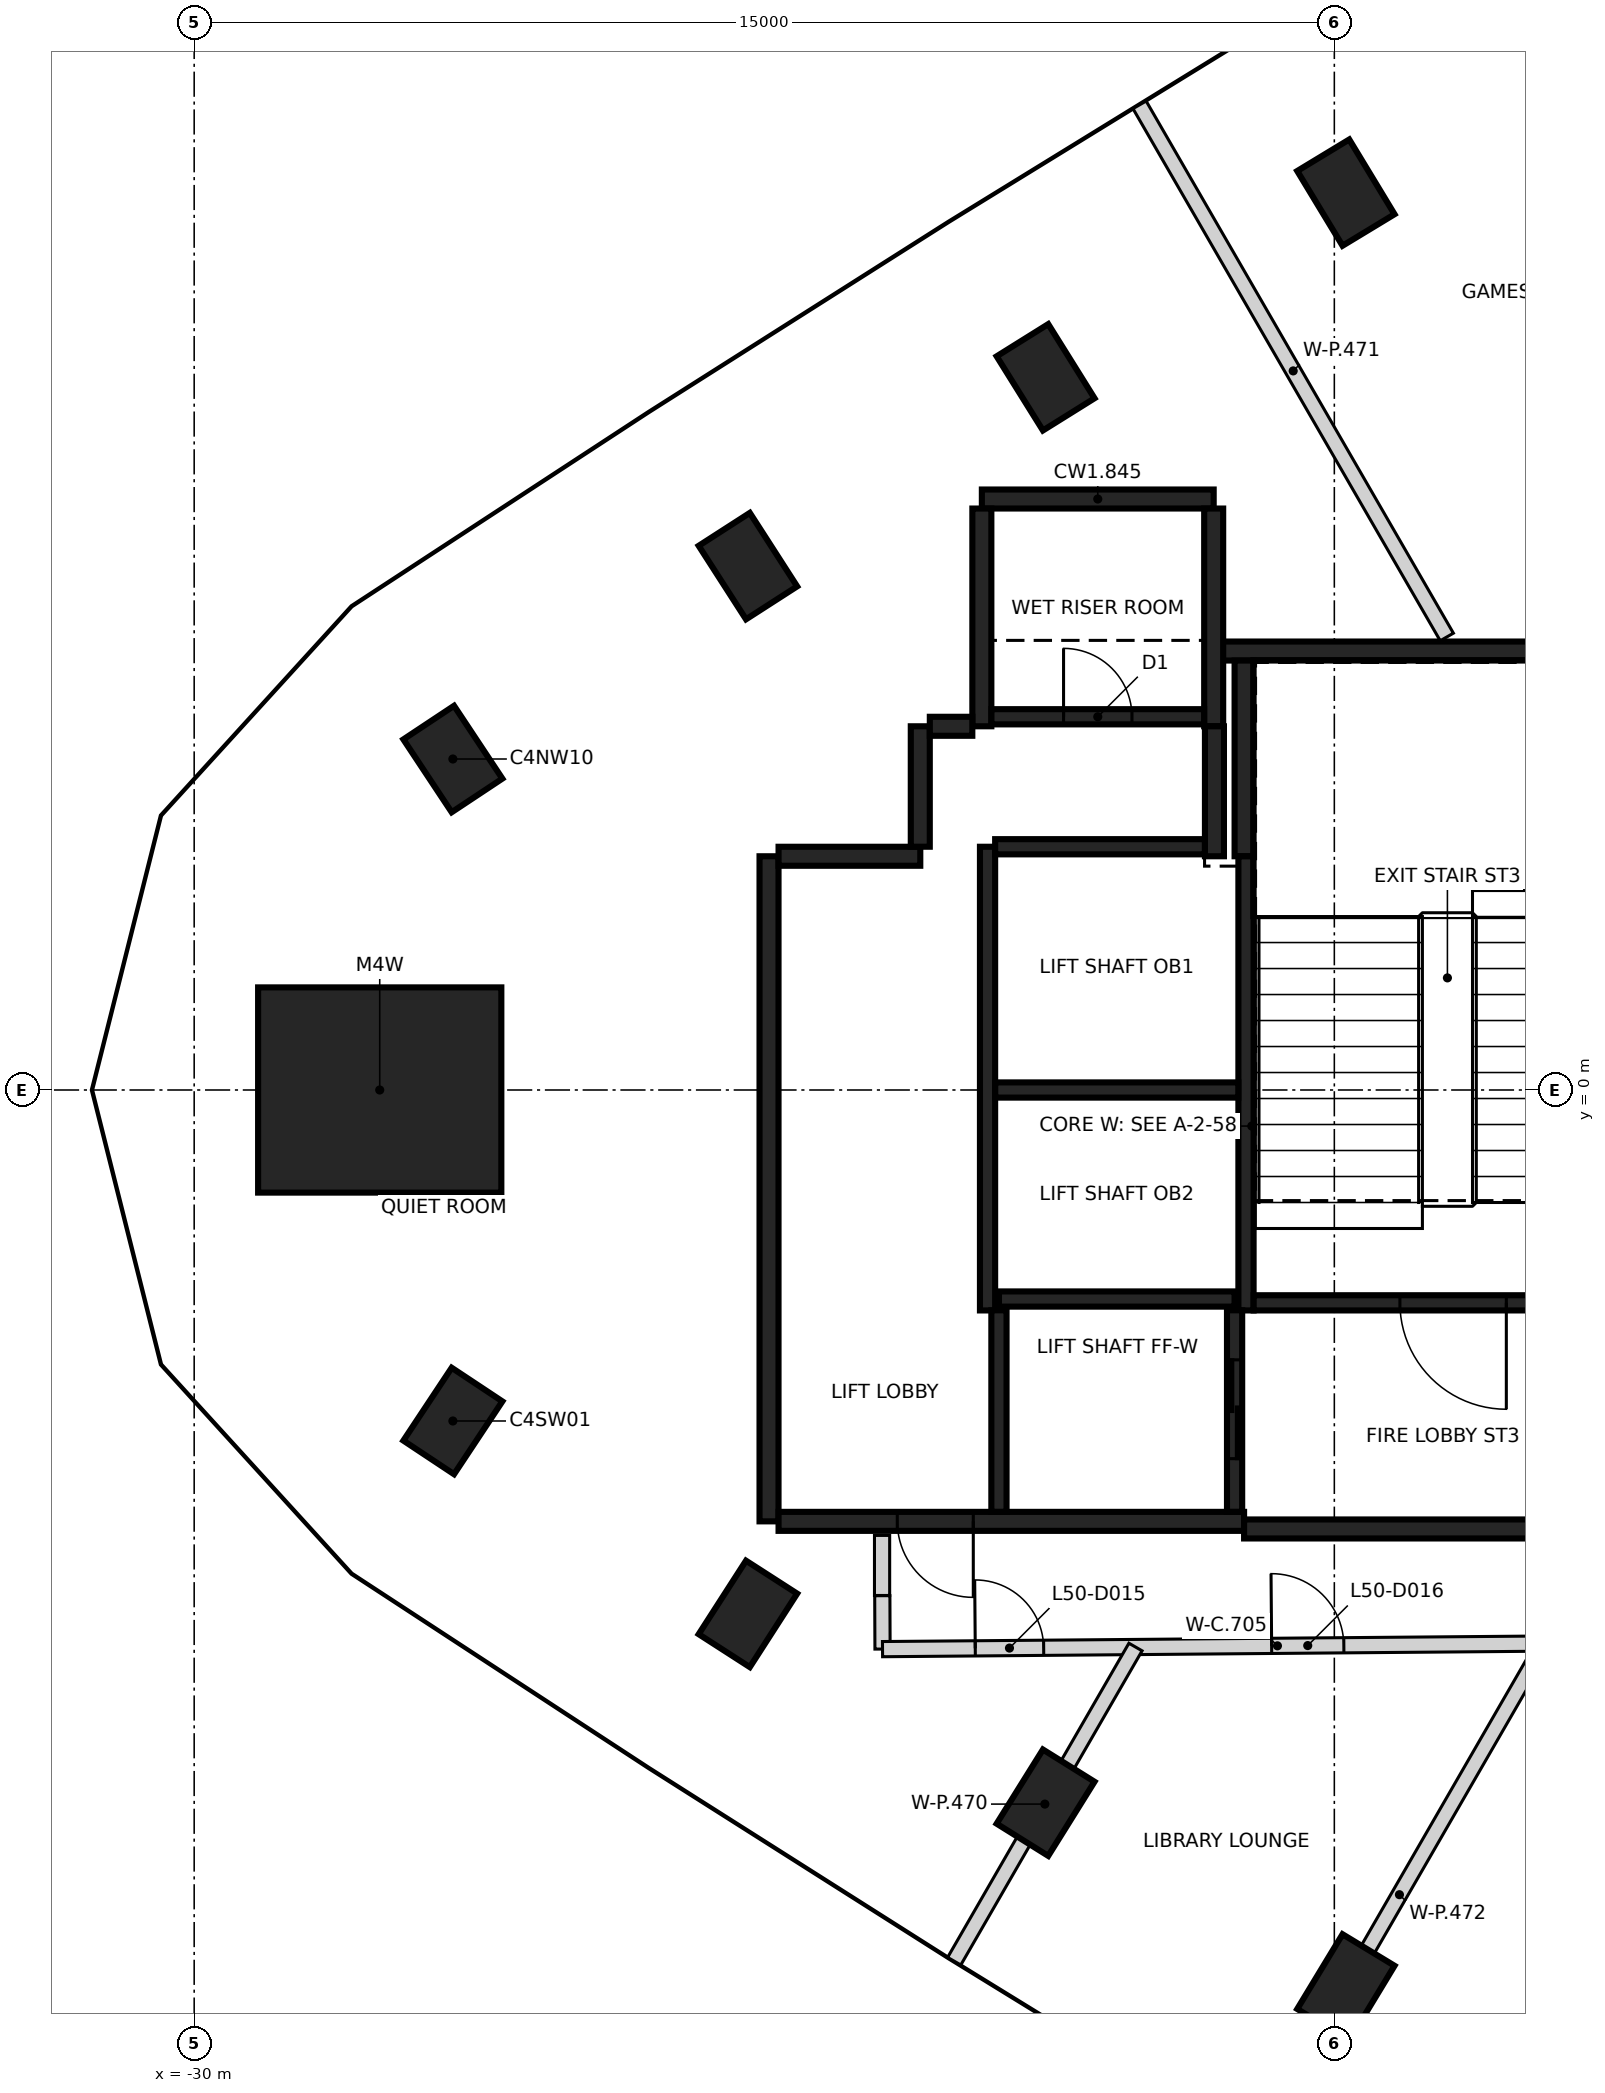
"""IFC4 building model, lengths in metres.
Left out: names, types, materials, properties, quantities, classifications, styles, units other than length and angle.
Written with IfcOpenShell. Run it as: python <this file> out.ifc"""

import sys

from ifc_helpers import new_model, si_unit, direction, frame, frame_2d, origin, origin_2d, place, context, subcontext, project, spatial, rectangle, extrude, element, fill, save


model = new_model("IFC4")
c1 = context("Model", 3, precision=1e-05, world=origin(), true_north=direction((0.0, 1.0)))
c2 = subcontext(c1, "Body", "Model", "MODEL_VIEW")
j1 = project(units=[si_unit("LENGTHUNIT", "METRE"), si_unit("PLANEANGLEUNIT", "RADIAN")], contexts=[c1])
p1 = place(None, origin())
s1 = spatial("IfcSite", under=j1, at=p1, CompositionType="ELEMENT")
p2 = place(p1, origin())
s2 = spatial("IfcBuilding", under=s1, at=p2, CompositionType="ELEMENT")
p3 = place(p2, frame((0.0, 0.0, 200.8)))
s3 = spatial("IfcBuildingStorey", under=s2, at=p3, CompositionType="ELEMENT", Elevation=200.8)
for number, where, z_axis, x_axis in (
    (1, (-14.848, 11.806, -0.35), (0.0, 0.0, 1.0), (-0.518, 0.855, 0.0)),
    (2, (-18.799, 9.376, -0.35), (0.0, 0.0, 1.0), (-0.529, 0.848, 0.0)),
    (3, (-22.715, 6.892, -0.35), (0.0, 0.0, 1.0), (-0.541, 0.841, 0.0)),
    (4, (-26.597, 4.354, -0.35), (0.0, 0.0, 1.0), (-0.553, 0.833, 0.0)),
    (5, (-26.597, -4.354, -0.35), (0.0, 0.0, 1.0), (0.553, 0.833, 0.0)),
    (6, (-22.715, -6.892, -0.35), (0.0, 0.0, 1.0), (0.541, 0.841, 0.0)),
    (7, (-18.799, -9.376, -0.35), (0.0, 0.0, 1.0), (0.529, 0.848, 0.0)),
    (8, (-14.848, -11.806, -0.35), (0.0, 0.0, 1.0), (0.518, 0.855, 0.0)),
):
    element("IfcColumn", number, at=place(p3, frame(where, z_axis=z_axis, x_axis=x_axis)), inside=s3, PredefinedType="COLUMN", context=c2, shape_type="SweptSolid", body=[
        extrude(rectangle(XDim=1.15, YDim=0.8, at=origin_2d()), origin(), (0.0, 0.0, 1.0), 3.6),
    ])
p4 = place(p3, frame((-27.559, 0.0, -0.35), z_axis=(0.0, 0.0, 1.0), x_axis=(1.0, 0.0, 0.0)))
e9 = element("IfcColumn", 9, at=p4, inside=s3, PredefinedType="COLUMN", context=c2, shape_type="SweptSolid", body=[
    extrude(rectangle(XDim=3.2, YDim=2.7, at=origin_2d()), origin(), (0.0, 0.0, 1.0), 3.6),
])
p5 = place(p3, frame((-22.437, -5.675, 0.0), z_axis=(0.0, 0.0, 1.0), x_axis=(0.0, 1.0, 0.0)))
e10 = element("IfcWall", 10, at=p5, inside=s3, PredefinedType="SHEAR", context=c2, shape_type="SweptSolid", body=[
    extrude(rectangle(XDim=8.75, YDim=0.25, at=frame_2d((4.375, 0.0))), origin(), (0.0, 0.0, 1.0), 3.25),
])
p6 = place(p3, frame((-16.187, -5.675, 0.0), z_axis=(0.0, 0.0, 1.0), x_axis=(-1.0, 0.0, 0.0)))
e11 = element("IfcWall", 11, at=p6, inside=s3, PredefinedType="SHEAR", context=c2, shape_type="SweptSolid", body=[
    extrude(rectangle(XDim=6.125, YDim=0.25, at=frame_2d((3.062, 0.0))), origin(), (0.0, 0.0, 1.0), 3.25),
])
p7 = place(p6, frame((3.563, 0.0, 0.0)))
e12 = element("IfcOpeningElement", 12, at=p7, cuts=e11, PredefinedType="OPENING", context=c2, shape_type="SweptSolid", body=[
    extrude(rectangle(XDim=1.0, YDim=2.1, at=frame_2d((0.5, 1.05))), frame((0.0, 0.135, 0.0), z_axis=(0.0, -1.0, 0.0), x_axis=(1.0, 0.0, 0.0)), (0.0, 0.0, 1.0), 0.27),
])
p8 = place(p3, frame((-10.963, -5.775, 0.0), z_axis=(0.0, 0.0, 1.0), x_axis=(-1.0, 0.0, 0.0)))
e13 = element("IfcWall", 13, at=p8, inside=s3, PredefinedType="SHEAR", context=c2, shape_type="SweptSolid", body=[
    extrude(rectangle(XDim=5.225, YDim=0.25, at=frame_2d((2.612, 0.0))), origin(), (0.0, 0.0, 1.0), 3.25),
])
p9 = place(p3, frame((-16.472, 5.775, 0.0), z_axis=(0.0, 0.0, 1.0), x_axis=(1.0, 0.0, 0.0)))
e14 = element("IfcWall", 14, at=p9, inside=s3, PredefinedType="SHEAR", context=c2, shape_type="SweptSolid", body=[
    extrude(rectangle(XDim=5.51, YDim=0.25, at=frame_2d((2.755, 0.0))), origin(), (0.0, 0.0, 1.0), 3.25),
])
p10 = place(p3, frame((-19.637, 7.775, 0.0), z_axis=(0.0, 0.0, 1.0), x_axis=(1.0, 0.0, 0.0)))
e15 = element("IfcWall", 15, at=p10, inside=s3, PredefinedType="SHEAR", context=c2, shape_type="SweptSolid", body=[
    extrude(rectangle(XDim=3.05, YDim=0.25, at=frame_2d((1.525, 0.0))), origin(), (0.0, 0.0, 1.0), 3.25),
])
for number, where, z_axis, x_axis in (
    (16, (-16.587, 7.65, 0.0), (0.0, 0.0, 1.0), (0.0, -1.0, 0.0)),
    (17, (-19.637, 4.785, 0.0), (0.0, 0.0, 1.0), (0.0, 1.0, 0.0)),
):
    element("IfcWall", number, at=place(p3, frame(where, z_axis=z_axis, x_axis=x_axis)), inside=s3, PredefinedType="SHEAR", context=c2, shape_type="SweptSolid", body=[
        extrude(rectangle(XDim=2.865, YDim=0.25, at=frame_2d((1.432, 0.0))), origin(), (0.0, 0.0, 1.0), 3.25),
    ])
p11 = place(p3, frame((-16.187, 3.075, 0.0), z_axis=(0.0, 0.0, 1.0), x_axis=(0.0, 1.0, 0.0)))
e18 = element("IfcWall", 18, at=p11, inside=s3, PredefinedType="SHEAR", context=c2, shape_type="SweptSolid", body=[
    extrude(rectangle(XDim=2.575, YDim=0.25, at=frame_2d((1.287, 0.0))), origin(), (0.0, 0.0, 1.0), 3.25),
])
p12 = place(p3, frame((-22.312, 3.075, 0.0), z_axis=(0.0, 0.0, 1.0), x_axis=(1.0, 0.0, 0.0)))
e19 = element("IfcWall", 19, at=p12, inside=s3, PredefinedType="SHEAR", context=c2, shape_type="SweptSolid", body=[
    extrude(rectangle(XDim=1.865, YDim=0.25, at=frame_2d((0.932, 0.0))), origin(), (0.0, 0.0, 1.0), 3.25),
])
p13 = place(p3, frame((-16.577, 4.785, 0.0), z_axis=(0.0, 0.0, 1.0), x_axis=(0.0, -1.0, 0.0)))
e20 = element("IfcWall", 20, at=p13, inside=s3, PredefinedType="SHEAR", context=c2, shape_type="SweptSolid", body=[
    extrude(rectangle(XDim=1.71, YDim=0.25, at=frame_2d((0.855, 0.0))), origin(), (0.0, 0.0, 1.0), 3.25),
])
p14 = place(p3, frame((-20.447, 3.2, 0.0), z_axis=(0.0, 0.0, 1.0), x_axis=(0.0, 1.0, 0.0)))
e21 = element("IfcWall", 21, at=p14, inside=s3, PredefinedType="SHEAR", context=c2, shape_type="SweptSolid", body=[
    extrude(rectangle(XDim=1.584, YDim=0.25, at=frame_2d((0.792, 0.0))), origin(), (0.0, 0.0, 1.0), 3.25),
])
p15 = place(p3, frame((-20.322, 4.785, 0.0), z_axis=(0.0, 0.0, 1.0), x_axis=(1.0, 0.0, 0.0)))
e22 = element("IfcWall", 22, at=p15, inside=s3, PredefinedType="SHEAR", context=c2, shape_type="SweptSolid", body=[
    extrude(rectangle(XDim=0.559, YDim=0.25, at=frame_2d((0.28, 0.0))), origin(), (0.0, 0.0, 1.0), 3.25),
])
p16 = place(p3, frame((-16.162, 3.074, 0.0), z_axis=(0.0, 0.0, 1.0), x_axis=(0.0, -1.0, 0.0)))
e23 = element("IfcWall", 23, at=p16, inside=s3, PredefinedType="SHEAR", context=c2, shape_type="SweptSolid", body=[
    extrude(rectangle(XDim=5.974, YDim=0.2, at=frame_2d((2.987, 0.0))), origin(), (0.0, 0.0, 1.0), 3.25),
])
p17 = place(p3, frame((-19.562, -2.9, 0.0), z_axis=(0.0, 0.0, 1.0), x_axis=(0.0, 1.0, 0.0)))
e24 = element("IfcWall", 24, at=p17, inside=s3, PredefinedType="SHEAR", context=c2, shape_type="SweptSolid", body=[
    extrude(rectangle(XDim=6.1, YDim=0.2, at=frame_2d((3.05, 0.0))), origin(), (0.0, 0.0, 1.0), 3.25),
])
p18 = place(p3, frame((-10.963, -2.8, 0.0), z_axis=(0.0, 0.0, 1.0), x_axis=(-1.0, 0.0, 0.0)))
e25 = element("IfcWall", 25, at=p18, inside=s3, PredefinedType="SHEAR", context=c2, shape_type="SweptSolid", body=[
    extrude(rectangle(XDim=5.098, YDim=0.2, at=frame_2d((2.549, 0.0))), origin(), (0.0, 0.0, 1.0), 3.25),
])
p19 = place(p18, frame((1.774, 0.0, 0.0)))
e26 = element("IfcOpeningElement", 26, at=p19, cuts=e25, PredefinedType="OPENING", context=c2, shape_type="SweptSolid", body=[
    extrude(rectangle(XDim=1.4, YDim=2.1, at=frame_2d((0.7, 1.05))), frame((0.0, 0.11, 0.0), z_axis=(0.0, -1.0, 0.0), x_axis=(1.0, 0.0, 0.0)), (0.0, 0.0, 1.0), 0.22),
])
p20 = place(p3, frame((-16.263, 0.0, 0.0), z_axis=(0.0, 0.0, 1.0), x_axis=(-1.0, 0.0, 0.0)))
e27 = element("IfcWall", 27, at=p20, inside=s3, PredefinedType="SHEAR", context=c2, shape_type="SweptSolid", body=[
    extrude(rectangle(XDim=3.198, YDim=0.2, at=frame_2d((1.599, 0.0))), origin(), (0.0, 0.0, 1.0), 3.25),
])
p21 = place(p3, frame((-19.511, 4.91, 0.0), z_axis=(0.0, 0.0, 1.0), x_axis=(1.0, 0.0, 0.0)))
e28 = element("IfcWall", 28, at=p21, inside=s3, PredefinedType="SHEAR", context=c2, shape_type="SweptSolid", body=[
    extrude(rectangle(XDim=2.798, YDim=0.2, at=frame_2d((1.399, 0.0))), origin(), (0.0, 0.0, 1.0), 3.25),
])
p22 = place(p21, frame((0.949, 0.0, 0.0)))
e29 = element("IfcOpeningElement", 29, at=p22, cuts=e28, PredefinedType="OPENING", context=c2, shape_type="SweptSolid", body=[
    extrude(rectangle(XDim=0.9, YDim=2.1, at=frame_2d((0.45, 1.05))), frame((0.0, 0.11, 0.0), z_axis=(0.0, -1.0, 0.0), x_axis=(1.0, 0.0, 0.0)), (0.0, 0.0, 1.0), 0.22),
])
p23 = place(p3, frame((-19.462, 3.2, 0.0), z_axis=(0.0, 0.0, 1.0), x_axis=(1.0, 0.0, 0.0)))
e30 = element("IfcWall", 30, at=p23, inside=s3, PredefinedType="SHEAR", context=c2, shape_type="SweptSolid", body=[
    extrude(rectangle(XDim=2.759, YDim=0.2, at=frame_2d((1.379, 0.0))), origin(), (0.0, 0.0, 1.0), 3.25),
])
p24 = place(p3, frame((-19.412, -2.75, 0.0), z_axis=(0.0, 0.0, 1.0), x_axis=(1.0, 0.0, 0.0)))
e31 = element("IfcWall", 31, at=p24, inside=s3, PredefinedType="SHEAR", context=c2, shape_type="SweptSolid", body=[
    extrude(rectangle(XDim=3.1, YDim=0.2, at=frame_2d((1.55, 0.0))), origin(), (0.0, 0.0, 1.0), 3.25),
])
p25 = place(p3, frame((-16.312, -2.898, 0.0), z_axis=(0.0, 0.0, 1.0), x_axis=(0.0, -1.0, 0.0)))
e32 = element("IfcWall", 32, at=p25, inside=s3, PredefinedType="SHEAR", context=c2, shape_type="SweptSolid", body=[
    extrude(rectangle(XDim=2.651, YDim=0.2, at=frame_2d((1.325, 0.0))), origin(), (0.0, 0.0, 1.0), 3.25),
])
p26 = place(p25, frame((0.652, 0.0, 0.0)))
e33 = element("IfcOpeningElement", 33, at=p26, cuts=e32, PredefinedType="OPENING", context=c2, shape_type="SweptSolid", body=[
    extrude(rectangle(XDim=1.3, YDim=2.1, at=frame_2d((0.65, 1.05))), frame((0.0, 0.11, 0.0), z_axis=(0.0, -1.0, 0.0), x_axis=(1.0, 0.0, 0.0)), (0.0, 0.0, 1.0), 0.22),
])
p27 = place(p3, frame((-19.412, -5.549, 0.0), z_axis=(0.0, 0.0, 1.0), x_axis=(0.0, 1.0, 0.0)))
e34 = element("IfcWall", 34, at=p27, inside=s3, PredefinedType="SHEAR", context=c2, shape_type="SweptSolid", body=[
    extrude(rectangle(XDim=2.651, YDim=0.2, at=frame_2d((1.325, 0.0))), origin(), (0.0, 0.0, 1.0), 3.25),
])
p28 = place(p3, frame((-20.95, -6.65, 0.0), z_axis=(0.0, 0.0, 1.0), x_axis=(0.0, 1.0, 0.0)))
e35 = element("IfcWall", 35, at=p28, inside=s3, PredefinedType="PARTITIONING", context=c2, shape_type="SweptSolid", body=[
    extrude(rectangle(XDim=0.79, YDim=0.2, at=frame_2d((0.395, 0.0))), origin(), (0.0, 0.0, 1.0), 3.25),
])
p29 = place(p3, frame((-20.947, -6.653, 0.0), z_axis=(0.0, 0.0, 1.0), x_axis=(0.004173876686, -0.999991289339, 0.0)))
e36 = element("IfcWall", 36, at=p29, inside=s3, PredefinedType="PARTITIONING", context=c2, shape_type="SweptSolid", body=[
    extrude(rectangle(XDim=0.702, YDim=0.2, at=frame_2d((0.351, 0.0))), origin(), (0.0, 0.0, 1.0), 3.25),
])
p30 = place(p3, frame((-20.944, -7.356, 0.0), z_axis=(0.0, 0.0, 1.0), x_axis=(0.999964824566, 0.00838746869, 0.0)))
e37 = element("IfcWall", 37, at=p30, inside=s3, PredefinedType="PARTITIONING", context=c2, shape_type="SweptSolid", body=[
    extrude(rectangle(XDim=10.391, YDim=0.2, at=frame_2d((5.196, 0.0))), origin(), (0.0, 0.0, 1.0), 3.25),
])
p31 = place(p30, frame((1.22, 0.0, 0.0)))
e38 = element("IfcOpeningElement", 38, at=p31, cuts=e37, PredefinedType="OPENING", context=c2, shape_type="SweptSolid", body=[
    extrude(rectangle(XDim=0.9, YDim=2.1, at=frame_2d((0.45, 1.05))), frame((0.0, 0.11, 0.0), z_axis=(0.0, -1.0, 0.0), x_axis=(1.0, 0.0, 0.0)), (0.0, 0.0, 1.0), 0.22),
])
p32 = place(p30, frame((5.119, 0.0, 0.0)))
e39 = element("IfcOpeningElement", 39, at=p32, cuts=e37, PredefinedType="OPENING", context=c2, shape_type="SweptSolid", body=[
    extrude(rectangle(XDim=0.95, YDim=2.1, at=frame_2d((0.475, 1.05))), frame((0.0, 0.11, 0.0), z_axis=(0.0, -1.0, 0.0), x_axis=(1.0, 0.0, 0.0)), (0.0, 0.0, 1.0), 0.22),
])
p33 = place(p3, frame((-20.001, -11.461, 0.0), z_axis=(0.0, 0.0, 1.0), x_axis=(0.499749027893, 0.866170254119, 0.0)))
e40 = element("IfcWall", 40, at=p33, inside=s3, PredefinedType="PARTITIONING", context=c2, shape_type="SweptSolid", body=[
    extrude(rectangle(XDim=4.772, YDim=0.2, at=frame_2d((2.386, 0.0))), origin(), (0.0, 0.0, 1.0), 3.25),
])
p34 = place(p3, frame((-17.562, 12.961, 0.0), z_axis=(0.0, 0.0, 1.0), x_axis=(0.500056194816, -0.865992957262, 0.0)))
e41 = element("IfcWall", 41, at=p34, inside=s3, PredefinedType="PARTITIONING", context=c2, shape_type="SweptSolid", body=[
    extrude(rectangle(XDim=8.084, YDim=0.2, at=frame_2d((4.042, 0.0))), origin(), (0.0, 0.0, 1.0), 2.35),
])
p35 = place(p3, frame((-16.05, -13.89, 0.0), z_axis=(0.0, 0.0, 1.0), x_axis=(0.499849898665, 0.866112047488, 0.0)))
e42 = element("IfcWall", 42, at=p35, inside=s3, PredefinedType="PARTITIONING", context=c2, shape_type="SweptSolid", body=[
    extrude(rectangle(XDim=7.628, YDim=0.2, at=frame_2d((3.814, 0.0))), origin(), (0.0, 0.0, 1.0), 3.25),
])
p36 = place(p26, origin())
e43 = element("IfcDoor", 43, at=p36, inside=s3, OperationType="SLIDING_TO_RIGHT", PredefinedType="DOOR", context=c2, shape_type="SweptSolid", body=[
    extrude(rectangle(XDim=1.3, YDim=2.1, at=frame_2d((0.65, 1.05))), frame((0.0, 0.025, 0.0), z_axis=(0.0, -1.0, 0.0), x_axis=(1.0, 0.0, 0.0)), (0.0, 0.0, 1.0), 0.05),
])
fill(e33, e43)
p37 = place(p7, origin())
e44 = element("IfcDoor", 44, at=p37, inside=s3, OperationType="SINGLE_SWING_LEFT", PredefinedType="DOOR", context=c2, shape_type="SweptSolid", body=[
    extrude(rectangle(XDim=1.0, YDim=2.1, at=frame_2d((0.5, 1.05))), frame((0.0, 0.025, 0.0), z_axis=(0.0, -1.0, 0.0), x_axis=(1.0, 0.0, 0.0)), (0.0, 0.0, 1.0), 0.05),
])
fill(e12, e44)
p38 = place(p19, origin())
e45 = element("IfcDoor", 45, at=p38, inside=s3, OperationType="SINGLE_SWING_RIGHT", PredefinedType="DOOR", context=c2, shape_type="SweptSolid", body=[
    extrude(rectangle(XDim=1.4, YDim=2.1, at=frame_2d((0.7, 1.05))), frame((0.0, 0.025, 0.0), z_axis=(0.0, -1.0, 0.0), x_axis=(1.0, 0.0, 0.0)), (0.0, 0.0, 1.0), 0.05),
])
fill(e26, e45)
p39 = place(p22, origin())
e46 = element("IfcDoor", 46, at=p39, inside=s3, OperationType="SINGLE_SWING_LEFT", PredefinedType="DOOR", context=c2, shape_type="SweptSolid", body=[
    extrude(rectangle(XDim=0.9, YDim=2.1, at=frame_2d((0.45, 1.05))), frame((0.0, 0.025, 0.0), z_axis=(0.0, -1.0, 0.0), x_axis=(1.0, 0.0, 0.0)), (0.0, 0.0, 1.0), 0.05),
])
fill(e29, e46)
p40 = place(p31, origin())
e47 = element("IfcDoor", 47, at=p40, inside=s3, OperationType="SINGLE_SWING_LEFT", PredefinedType="DOOR", context=c2, shape_type="SweptSolid", body=[
    extrude(rectangle(XDim=0.9, YDim=2.1, at=frame_2d((0.45, 1.05))), frame((0.0, 0.025, 0.0), z_axis=(0.0, -1.0, 0.0), x_axis=(1.0, 0.0, 0.0)), (0.0, 0.0, 1.0), 0.05),
])
fill(e38, e47)
p41 = place(p32, frame((0.95, 0.0, 0.0), z_axis=(0.0, 0.0, 1.0), x_axis=(-1.0, 0.0, 0.0)))
e48 = element("IfcDoor", 48, at=p41, inside=s3, OperationType="SINGLE_SWING_LEFT", PredefinedType="DOOR", context=c2, shape_type="SweptSolid", body=[
    extrude(rectangle(XDim=0.95, YDim=2.1, at=frame_2d((0.475, 1.05))), frame((0.0, 0.025, 0.0), z_axis=(0.0, -1.0, 0.0), x_axis=(1.0, 0.0, 0.0)), (0.0, 0.0, 1.0), 0.05),
])
fill(e39, e48)
save(model, sys.argv[1])
